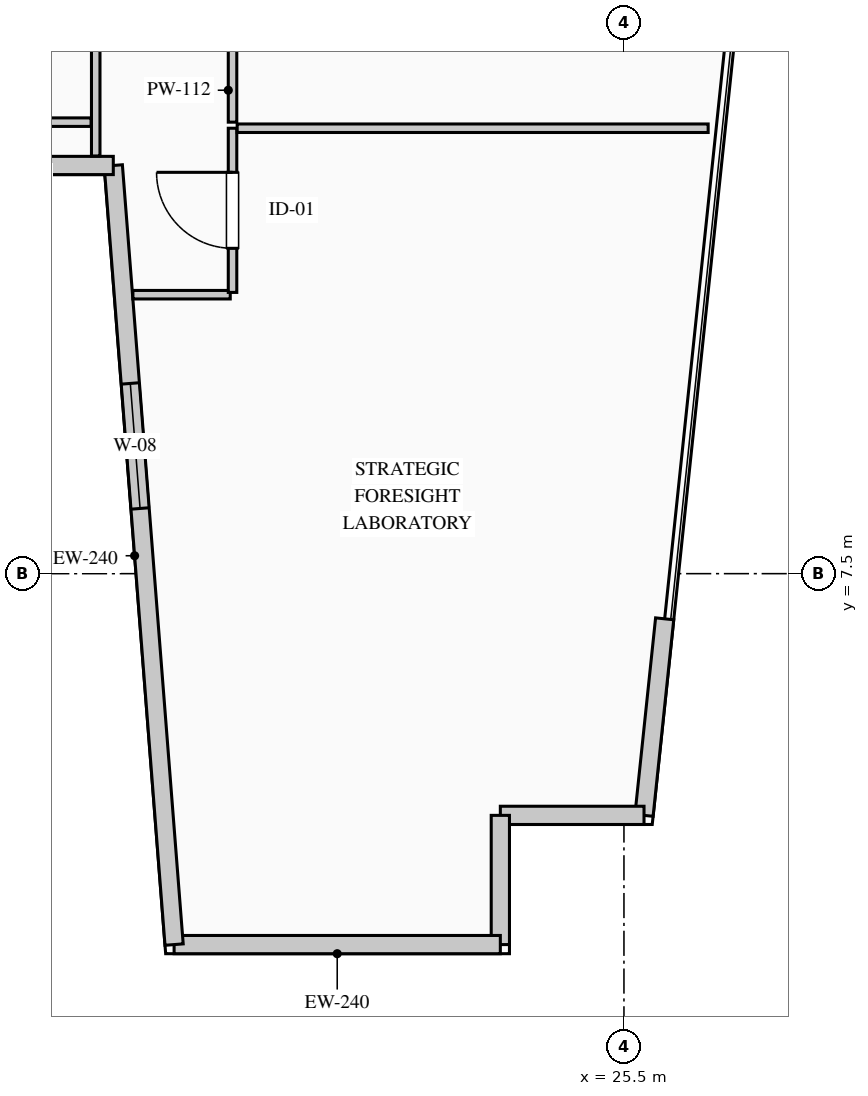
"""IFC4 building model, lengths in metres.
Left out: names, types, materials, properties, quantities, classifications, styles, units other than length and angle.
Written with IfcOpenShell. Run it as: python <this file> out.ifc"""

import sys

from ifc_helpers import new_model, si_unit, direction, frame, frame_2d, origin, place, context, subcontext, project, spatial, rectangle, extrude, element, fill, save


model = new_model("IFC4")
c1 = context("Model", 3, precision=1e-05, world=origin(), true_north=direction((0.0, 1.0)))
c2 = subcontext(c1, "Body", "Model", "MODEL_VIEW")
j1 = project(units=[si_unit("LENGTHUNIT", "METRE"), si_unit("PLANEANGLEUNIT", "RADIAN")], contexts=[c1])
p1 = place(None, origin())
s1 = spatial("IfcSite", under=j1, at=p1, CompositionType="ELEMENT")
p2 = place(p1, origin())
s2 = spatial("IfcBuilding", under=s1, at=p2, CompositionType="ELEMENT")
p3 = place(p2, frame((0.0, 0.0, 284.35)))
s3 = spatial("IfcBuildingStorey", under=s2, at=p3, CompositionType="ELEMENT", Elevation=284.35)
p4 = place(p3, frame((26.036, 6.906, 0.0), z_axis=(0.0, 0.0, 1.0), x_axis=(-0.104513699976, -0.994523446942, 0.0)))
e1 = element("IfcWall", 1, at=p4, inside=s3, PredefinedType="STANDARD", context=c2, shape_type="SweptSolid", body=[
    extrude(rectangle(XDim=2.6, YDim=0.24, at=frame_2d((1.3, 0.0))), origin(), (0.0, 0.0, 1.0), 3.7),
])
p5 = place(p3, frame((25.764, 4.32, 0.0), z_axis=(0.0, 0.0, 1.0), x_axis=(-1.0, 0.0, 0.0)))
e2 = element("IfcWall", 2, at=p5, inside=s3, PredefinedType="STANDARD", context=c2, shape_type="SweptSolid", body=[
    extrude(rectangle(XDim=1.89, YDim=0.24, at=frame_2d((0.945, 0.0))), origin(), (0.0, 0.0, 1.0), 3.7),
])
p6 = place(p3, frame((23.874, 4.32, 0.0), z_axis=(0.0, 0.0, 1.0), x_axis=(0.0, -1.0, 0.0)))
e3 = element("IfcWall", 3, at=p6, inside=s3, PredefinedType="STANDARD", context=c2, shape_type="SweptSolid", body=[
    extrude(rectangle(XDim=1.7, YDim=0.24, at=frame_2d((0.85, 0.0))), origin(), (0.0, 0.0, 1.0), 3.7),
])
p7 = place(p3, frame((23.874, 2.62, 0.0), z_axis=(0.0, 0.0, 1.0), x_axis=(-1.0, 0.0, 0.0)))
e4 = element("IfcWall", 4, at=p7, inside=s3, PredefinedType="STANDARD", context=c2, shape_type="SweptSolid", body=[
    extrude(rectangle(XDim=4.292, YDim=0.24, at=frame_2d((2.146, 0.0))), origin(), (0.0, 0.0, 1.0), 3.7),
])
p8 = place(p3, frame((19.581, 2.62, 0.0), z_axis=(0.0, 0.0, 1.0), x_axis=(-0.077816860153, 0.996967670627, 0.0)))
e5 = element("IfcWall", 5, at=p8, inside=s3, PredefinedType="STANDARD", context=c2, shape_type="SweptSolid", body=[
    extrude(rectangle(XDim=10.281, YDim=0.24, at=frame_2d((5.141, 0.0))), origin(), (0.0, 0.0, 1.0), 3.7),
])
p9 = place(p8, frame((5.755, 0.0, 0.9)))
e6 = element("IfcOpeningElement", 6, at=p9, cuts=e5, PredefinedType="OPENING", context=c2, shape_type="SweptSolid", body=[
    extrude(rectangle(XDim=1.65, YDim=1.95, at=frame_2d((0.825, 0.975))), frame((0.0, 0.13, 0.0), z_axis=(0.0, -1.0, 0.0), x_axis=(1.0, 0.0, 0.0)), (0.0, 0.0, 1.0), 0.26),
])
p10 = place(p3, frame((18.781, 12.87, 0.0), z_axis=(0.0, 0.0, 1.0), x_axis=(-1.0, 0.0, 0.0)))
e7 = element("IfcWall", 7, at=p10, inside=s3, PredefinedType="STANDARD", context=c2, shape_type="SweptSolid", body=[
    extrude(rectangle(XDim=3.641, YDim=0.24, at=frame_2d((1.82, 0.0))), origin(), (0.0, 0.0, 1.0), 3.7),
])
p11 = place(p3, frame((19.039, 11.17, 0.0), z_axis=(0.0, 0.0, 1.0), x_axis=(1.0, 0.0, 0.0)))
e8 = element("IfcWall", 8, at=p11, inside=s3, PredefinedType="PARTITIONING", context=c2, shape_type="SweptSolid", body=[
    extrude(rectangle(XDim=1.281, YDim=0.112, at=frame_2d((0.64, 0.0))), origin(), (0.0, 0.0, 1.0), 3.7),
])
p12 = place(p3, frame((20.35, 11.2, 0.0), z_axis=(0.0, 0.0, 1.0), x_axis=(0.0, 1.0, 0.0)))
e9 = element("IfcWall", 9, at=p12, inside=s3, PredefinedType="PARTITIONING", context=c2, shape_type="SweptSolid", body=[
    extrude(rectangle(XDim=2.16, YDim=0.112, at=frame_2d((1.08, 0.0))), origin(), (0.0, 0.0, 1.0), 3.7),
])
p13 = place(p12, frame((0.58, 0.0, 0.0)))
e10 = element("IfcOpeningElement", 10, at=p13, cuts=e9, PredefinedType="OPENING", context=c2, shape_type="SweptSolid", body=[
    extrude(rectangle(XDim=1.0, YDim=2.15, at=frame_2d((0.5, 1.075))), frame((0.0, 0.066, 0.0), z_axis=(0.0, -1.0, 0.0), x_axis=(1.0, 0.0, 0.0)), (0.0, 0.0, 1.0), 0.132),
])
p14 = place(p3, frame((20.411, 13.36, 0.0), z_axis=(0.0, 0.0, 1.0), x_axis=(1.0, 0.0, 0.0)))
e11 = element("IfcWall", 11, at=p14, inside=s3, PredefinedType="PARTITIONING", context=c2, shape_type="SweptSolid", body=[
    extrude(rectangle(XDim=6.197, YDim=0.112, at=frame_2d((3.099, 0.0))), origin(), (0.0, 0.0, 1.0), 3.7),
])
p15 = place(p3, frame((20.35, 13.44, 0.0), z_axis=(0.0, 0.0, 1.0), x_axis=(0.0, 1.0, 0.0)))
e12 = element("IfcWall", 12, at=p15, inside=s3, PredefinedType="PARTITIONING", context=c2, shape_type="SweptSolid", body=[
    extrude(rectangle(XDim=3.58, YDim=0.112, at=frame_2d((1.79, 0.0))), origin(), (0.0, 0.0, 1.0), 3.7),
])
p16 = place(p15, frame((1.29, 0.0, 0.0)))
e13 = element("IfcOpeningElement", 13, at=p16, cuts=e12, PredefinedType="OPENING", context=c2, shape_type="SweptSolid", body=[
    extrude(rectangle(XDim=1.0, YDim=2.15, at=frame_2d((0.5, 1.075))), frame((0.0, 0.066, 0.0), z_axis=(0.0, -1.0, 0.0), x_axis=(1.0, 0.0, 0.0)), (0.0, 0.0, 1.0), 0.132),
])
p17 = place(p3, frame((18.55, 19.559, 0.0), z_axis=(0.0, 0.0, 1.0), x_axis=(0.0, -1.0, 0.0)))
e14 = element("IfcWall", 14, at=p17, inside=s3, PredefinedType="PARTITIONING", context=c2, shape_type="SweptSolid", body=[
    extrude(rectangle(XDim=6.564, YDim=0.112, at=frame_2d((3.282, 0.0))), origin(), (0.0, 0.0, 1.0), 3.7),
])
p18 = place(p3, frame((18.489, 13.44, 0.0), z_axis=(0.0, 0.0, 1.0), x_axis=(-1.0, 0.0, 0.0)))
e15 = element("IfcWall", 15, at=p18, inside=s3, PredefinedType="PARTITIONING", context=c2, shape_type="SweptSolid", body=[
    extrude(rectangle(XDim=2.474, YDim=0.112, at=frame_2d((1.237, 0.0))), origin(), (0.0, 0.0, 1.0), 3.7),
])
p19 = place(p9, origin())
e16 = element("IfcWindow", 16, at=p19, inside=s3, PartitioningType="SINGLE_PANEL", PredefinedType="WINDOW", context=c2, shape_type="SweptSolid", body=[
    extrude(rectangle(XDim=1.65, YDim=1.95, at=frame_2d((0.825, 0.975))), frame((0.0, 0.03, 0.0), z_axis=(0.0, -1.0, 0.0), x_axis=(1.0, 0.0, 0.0)), (0.0, 0.0, 1.0), 0.06),
])
fill(e6, e16)
p20 = place(p13, origin())
e17 = element("IfcDoor", 17, at=p20, inside=s3, OperationType="SINGLE_SWING_RIGHT", PredefinedType="DOOR", context=c2, shape_type="SweptSolid", body=[
    extrude(rectangle(XDim=1.0, YDim=2.15, at=frame_2d((0.5, 1.075))), frame((0.0, 0.025, 0.0), z_axis=(0.0, -1.0, 0.0), x_axis=(1.0, 0.0, 0.0)), (0.0, 0.0, 1.0), 0.05),
])
fill(e10, e17)
save(model, sys.argv[1])
